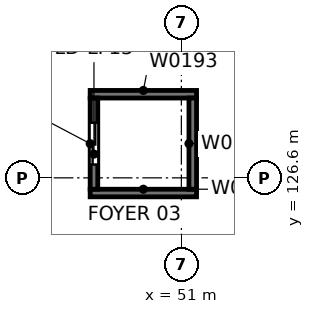
"""IFC4 building model, lengths in metres.
Left out: names, types, materials, properties, quantities, classifications, styles, units other than length and angle.
Written with IfcOpenShell. Run it as: python <this file> out.ifc"""

import sys

from ifc_helpers import new_model, si_unit, direction, frame, frame_2d, origin, place, context, subcontext, project, spatial, rectangle, extrude, element, fill, save


model = new_model("IFC4")
c1 = context("Model", 3, precision=1e-05, world=origin(), true_north=direction((0.0, 1.0)))
c2 = subcontext(c1, "Body", "Model", "MODEL_VIEW")
j1 = project(units=[si_unit("LENGTHUNIT", "METRE"), si_unit("PLANEANGLEUNIT", "RADIAN")], contexts=[c1])
p1 = place(None, origin())
s1 = spatial("IfcSite", under=j1, at=p1, CompositionType="ELEMENT")
p2 = place(p1, origin())
s2 = spatial("IfcBuilding", under=s1, at=p2, CompositionType="ELEMENT")
p3 = place(p2, frame((0.0, 0.0, 4.8)))
s3 = spatial("IfcBuildingStorey", under=s2, at=p3, CompositionType="ELEMENT", Elevation=4.8)
for number, where, z_axis, x_axis in (
    (1, (48.6, 126.2, 0.0), (0.0, 0.0, 1.0), (1.0, 0.0, 0.0)),
    (2, (48.6, 128.8, 0.0), (0.0, 0.0, 1.0), (1.0, 0.0, 0.0)),
):
    element("IfcWall", number, at=place(p3, frame(where, z_axis=z_axis, x_axis=x_axis)), inside=s3, PredefinedType="SOLIDWALL", context=c2, shape_type="SweptSolid", body=[
        extrude(rectangle(XDim=2.8, YDim=0.2, at=frame_2d((1.4, 0.0))), origin(), (0.0, 0.0, 1.0), 4.8),
    ])
p4 = place(p3, frame((48.7, 126.3, 0.0), z_axis=(0.0, 0.0, 1.0), x_axis=(0.0, 1.0, 0.0)))
e3 = element("IfcWall", 3, at=p4, inside=s3, PredefinedType="SOLIDWALL", context=c2, shape_type="SweptSolid", body=[
    extrude(rectangle(XDim=2.4, YDim=0.2, at=frame_2d((1.2, 0.0))), origin(), (0.0, 0.0, 1.0), 4.8),
])
p5 = place(p4, frame((0.65, 0.0, 0.0)))
e4 = element("IfcOpeningElement", 4, at=p5, cuts=e3, PredefinedType="OPENING", context=c2, shape_type="SweptSolid", body=[
    extrude(rectangle(XDim=1.1, YDim=2.1, at=frame_2d((0.55, 1.05))), frame((0.0, 0.11, 0.0), z_axis=(0.0, -1.0, 0.0), x_axis=(1.0, 0.0, 0.0)), (0.0, 0.0, 1.0), 0.22),
])
p6 = place(p3, frame((51.3, 126.3, 0.0), z_axis=(0.0, 0.0, 1.0), x_axis=(0.0, 1.0, 0.0)))
e5 = element("IfcWall", 5, at=p6, inside=s3, PredefinedType="SOLIDWALL", context=c2, shape_type="SweptSolid", body=[
    extrude(rectangle(XDim=2.4, YDim=0.2, at=frame_2d((1.2, 0.0))), origin(), (0.0, 0.0, 1.0), 4.8),
])
p7 = place(p5, origin())
e6 = element("IfcDoor", 6, at=p7, inside=s3, OperationType="SLIDING_TO_LEFT", PredefinedType="DOOR", context=c2, shape_type="SweptSolid", body=[
    extrude(rectangle(XDim=1.1, YDim=2.1, at=frame_2d((0.55, 1.05))), frame((0.0, 0.025, 0.0), z_axis=(0.0, -1.0, 0.0), x_axis=(1.0, 0.0, 0.0)), (0.0, 0.0, 1.0), 0.05),
])
fill(e4, e6)
save(model, sys.argv[1])
